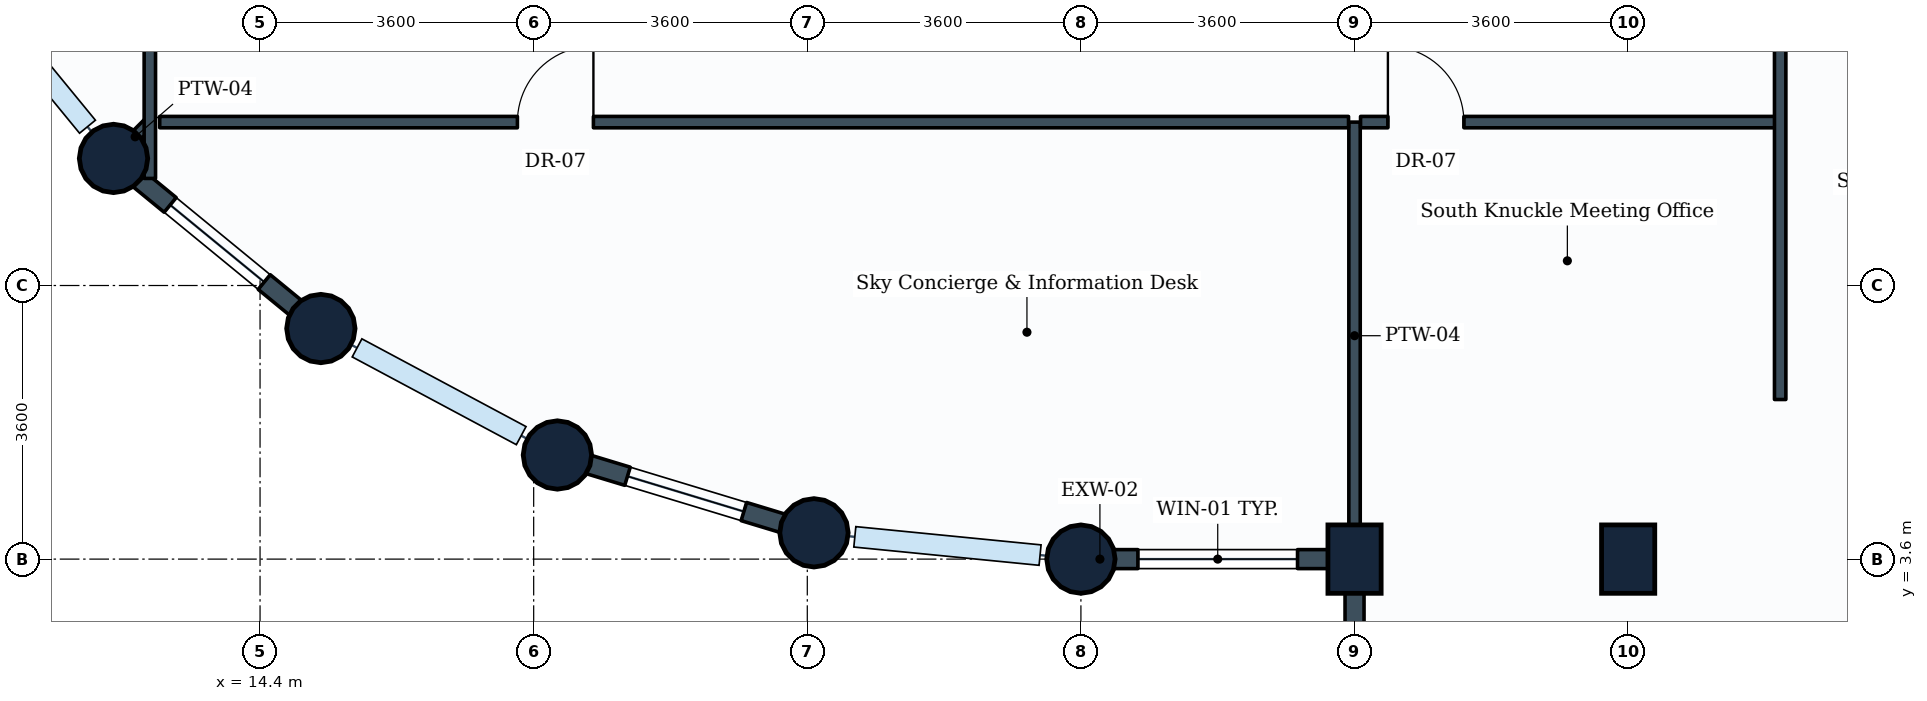
"""IFC4 building model, lengths in metres.
Left out: names, types, materials, properties, quantities, classifications, styles, units other than length and angle.
Written with IfcOpenShell. Run it as: python <this file> out.ifc"""

import sys

from ifc_helpers import new_model, si_unit, direction, frame, frame_2d, origin, origin_2d, place, context, subcontext, project, spatial, rectangle, circle, extrude, element, fill, save


model = new_model("IFC4")
c1 = context("Model", 3, precision=1e-05, world=origin(), true_north=direction((0.0, 1.0)))
c2 = subcontext(c1, "Body", "Model", "MODEL_VIEW")
j1 = project(units=[si_unit("LENGTHUNIT", "METRE"), si_unit("PLANEANGLEUNIT", "RADIAN")], contexts=[c1])
p1 = place(None, origin())
s1 = spatial("IfcSite", under=j1, at=p1, CompositionType="ELEMENT")
p2 = place(p1, origin())
s2 = spatial("IfcBuilding", under=s1, at=p2, CompositionType="ELEMENT")
p3 = place(p2, frame((0.0, 0.0, 209.0)))
s3 = spatial("IfcBuildingStorey", under=s2, at=p3, CompositionType="ELEMENT", Elevation=209.0)
for number, where, z_axis, x_axis in (
    (1, (12.472, 8.872, 0.0), (0.0, 0.0, 1.0), (1.0, 0.0, 0.0)),
    (2, (15.2, 6.634, 0.0), (0.0, 0.0, 1.0), (1.0, 0.0, 0.0)),
    (3, (18.312, 4.97, 0.0), (0.0, 0.0, 1.0), (1.0, 0.0, 0.0)),
    (4, (21.688, 3.946, 0.0), (0.0, 0.0, 1.0), (1.0, 0.0, 0.0)),
    (5, (25.2, 3.6, 0.0), (0.0, 0.0, 1.0), (1.0, 0.0, 0.0)),
):
    element("IfcColumn", number, at=place(p3, frame(where, z_axis=z_axis, x_axis=x_axis)), inside=s3, PredefinedType="COLUMN", context=c2, shape_type="SweptSolid", body=[
        extrude(circle(Radius=0.45, at=origin_2d()), origin(), (0.0, 0.0, 1.0), 4.8),
    ])
for number, where, z_axis, x_axis in (
    (6, (28.8, 3.6, 0.0), (0.0, 0.0, 1.0), (1.0, 0.0, 0.0)),
    (7, (32.4, 3.6, 0.0), (0.0, 0.0, 1.0), (1.0, 0.0, 0.0)),
):
    element("IfcColumn", number, at=place(p3, frame(where, z_axis=z_axis, x_axis=x_axis)), inside=s3, PredefinedType="COLUMN", context=c2, shape_type="SweptSolid", body=[
        extrude(rectangle(XDim=0.7, YDim=0.9, at=origin_2d()), origin(), (0.0, 0.0, 1.0), 4.8),
    ])
p4 = place(p3, frame((28.8, 3.6, 0.0), z_axis=(0.0, 0.0, 1.0), x_axis=(-1.0, 0.0, 0.0)))
e8 = element("IfcWall", 8, at=p4, inside=s3, PredefinedType="STANDARD", context=c2, shape_type="SweptSolid", body=[
    extrude(rectangle(XDim=3.6, YDim=0.25, at=frame_2d((1.8, 0.0))), origin(), (0.0, 0.0, 1.0), 3.93),
])
p5 = place(p4, frame((0.75, 0.0, 0.85)))
e9 = element("IfcOpeningElement", 9, at=p5, cuts=e8, PredefinedType="OPENING", context=c2, shape_type="SweptSolid", body=[
    extrude(rectangle(XDim=2.1, YDim=1.35, at=frame_2d((1.05, 0.675))), frame((0.0, 0.135, 0.0), z_axis=(0.0, -1.0, 0.0), x_axis=(1.0, 0.0, 0.0)), (0.0, 0.0, 1.0), 0.27),
])
p6 = place(p3, frame((28.8, 3.6, 0.0), z_axis=(0.0, 0.0, 1.0), x_axis=(0.0, -1.0, 0.0)))
e10 = element("IfcWall", 10, at=p6, inside=s3, PredefinedType="STANDARD", context=c2, shape_type="SweptSolid", body=[
    extrude(rectangle(XDim=2.1, YDim=0.25, at=frame_2d((1.05, 0.0))), origin(), (0.0, 0.0, 1.0), 3.93),
])
p7 = place(p3, frame((15.2, 6.634, 0.0), z_axis=(0.0, 0.0, 1.0), x_axis=(-0.773121216285, 0.634258295121, 0.0)))
e11 = element("IfcWall", 11, at=p7, inside=s3, PredefinedType="STANDARD", context=c2, shape_type="SweptSolid", body=[
    extrude(rectangle(XDim=3.529, YDim=0.25, at=frame_2d((1.764, 0.0))), origin(), (0.0, 0.0, 1.0), 3.93),
])
p8 = place(p7, frame((0.964, 0.0, 0.85)))
e12 = element("IfcOpeningElement", 12, at=p8, cuts=e11, PredefinedType="OPENING", context=c2, shape_type="SweptSolid", body=[
    extrude(rectangle(XDim=1.6, YDim=1.35, at=frame_2d((0.8, 0.675))), frame((0.0, 0.135, 0.0), z_axis=(0.0, -1.0, 0.0), x_axis=(1.0, 0.0, 0.0)), (0.0, 0.0, 1.0), 0.27),
])
p9 = place(p3, frame((21.688, 3.946, 0.0), z_axis=(0.0, 0.0, 1.0), x_axis=(-0.956953367403, 0.290241714123, 0.0)))
e13 = element("IfcWall", 13, at=p9, inside=s3, PredefinedType="STANDARD", context=c2, shape_type="SweptSolid", body=[
    extrude(rectangle(XDim=3.528, YDim=0.25, at=frame_2d((1.764, 0.0))), origin(), (0.0, 0.0, 1.0), 3.93),
])
p10 = place(p9, frame((0.964, 0.0, 0.85)))
e14 = element("IfcOpeningElement", 14, at=p10, cuts=e13, PredefinedType="OPENING", context=c2, shape_type="SweptSolid", body=[
    extrude(rectangle(XDim=1.6, YDim=1.35, at=frame_2d((0.8, 0.675))), frame((0.0, 0.135, 0.0), z_axis=(0.0, -1.0, 0.0), x_axis=(1.0, 0.0, 0.0)), (0.0, 0.0, 1.0), 0.27),
])
p11 = place(p3, frame((28.8, 9.35, 0.0), z_axis=(0.0, 0.0, 1.0), x_axis=(0.0, -1.0, 0.0)))
e15 = element("IfcWall", 15, at=p11, inside=s3, PredefinedType="PARTITIONING", context=c2, shape_type="SweptSolid", body=[
    extrude(rectangle(XDim=5.621, YDim=0.15, at=frame_2d((2.811, 0.0))), origin(), (0.0, 0.0, 1.0), 4.535),
])
p12 = place(p3, frame((12.95, 9.35, 0.0), z_axis=(0.0, 0.0, 1.0), x_axis=(-0.706883613527, -0.707329878435, 0.0)))
e16 = element("IfcWall", 16, at=p12, inside=s3, PredefinedType="PARTITIONING", context=c2, shape_type="SweptSolid", body=[
    extrude(rectangle(XDim=0.547, YDim=0.15, at=frame_2d((0.273, 0.0))), origin(), (0.0, 0.0, 1.0), 4.26),
])
p13 = place(p3, frame((12.95, 8.609, 0.0), z_axis=(0.0, 0.0, 1.0), x_axis=(0.0, 1.0, 0.0)))
e17 = element("IfcWall", 17, at=p13, inside=s3, PredefinedType="PARTITIONING", context=c2, shape_type="SweptSolid", body=[
    extrude(rectangle(XDim=16.512, YDim=0.15, at=frame_2d((8.256, 0.0))), origin(), (0.0, 0.0, 1.0), 3.93),
])
p14 = place(p13, frame((7.731, 0.0, 0.0)))
e18 = element("IfcOpeningElement", 18, at=p14, cuts=e17, PredefinedType="OPENING", context=c2, shape_type="SweptSolid", body=[
    extrude(rectangle(XDim=1.0, YDim=2.1, at=frame_2d((0.5, 1.05))), frame((0.0, 0.085, 0.0), z_axis=(0.0, -1.0, 0.0), x_axis=(1.0, 0.0, 0.0)), (0.0, 0.0, 1.0), 0.17),
])
p15 = place(p3, frame((13.08, 9.35, 0.0), z_axis=(0.0, 0.0, 1.0), x_axis=(1.0, 0.0, 0.0)))
e19 = element("IfcWall", 19, at=p15, inside=s3, PredefinedType="PARTITIONING", context=c2, shape_type="SweptSolid", body=[
    extrude(rectangle(XDim=15.641, YDim=0.15, at=frame_2d((7.82, 0.0))), origin(), (0.0, 0.0, 1.0), 4.22),
])
p16 = place(p15, frame((4.706, 0.0, 0.0)))
e20 = element("IfcOpeningElement", 20, at=p16, cuts=e19, PredefinedType="OPENING", context=c2, shape_type="SweptSolid", body=[
    extrude(rectangle(XDim=1.0, YDim=2.1, at=frame_2d((0.5, 1.05))), frame((0.0, 0.085, 0.0), z_axis=(0.0, -1.0, 0.0), x_axis=(1.0, 0.0, 0.0)), (0.0, 0.0, 1.0), 0.17),
])
p17 = place(p3, frame((28.879, 9.35, 0.0), z_axis=(0.0, 0.0, 1.0), x_axis=(1.0, 0.0, 0.0)))
e21 = element("IfcWall", 21, at=p17, inside=s3, PredefinedType="PARTITIONING", context=c2, shape_type="SweptSolid", body=[
    extrude(rectangle(XDim=5.521, YDim=0.15, at=frame_2d((2.76, 0.0))), origin(), (0.0, 0.0, 1.0), 4.535),
])
p18 = place(p17, frame((0.36, 0.0, 0.0)))
e22 = element("IfcOpeningElement", 22, at=p18, cuts=e21, PredefinedType="OPENING", context=c2, shape_type="SweptSolid", body=[
    extrude(rectangle(XDim=1.0, YDim=2.1, at=frame_2d((0.5, 1.05))), frame((0.0, 0.085, 0.0), z_axis=(0.0, -1.0, 0.0), x_axis=(1.0, 0.0, 0.0)), (0.0, 0.0, 1.0), 0.17),
])
p19 = place(p3, frame((34.4, 5.7, 0.0), z_axis=(0.0, 0.0, 1.0), x_axis=(0.0, 1.0, 0.0)))
e23 = element("IfcWall", 23, at=p19, inside=s3, PredefinedType="PARTITIONING", context=c2, shape_type="SweptSolid", body=[
    extrude(rectangle(XDim=4.95, YDim=0.15, at=frame_2d((2.475, 0.0))), origin(), (0.0, 0.0, 1.0), 4.535),
])
p20 = place(p5, origin())
e24 = element("IfcWindow", 24, at=p20, inside=s3, PartitioningType="SINGLE_PANEL", PredefinedType="WINDOW", context=c2, shape_type="SweptSolid", body=[
    extrude(rectangle(XDim=2.1, YDim=1.35, at=frame_2d((1.05, 0.675))), frame((0.0, 0.03, 0.0), z_axis=(0.0, -1.0, 0.0), x_axis=(1.0, 0.0, 0.0)), (0.0, 0.0, 1.0), 0.06),
])
fill(e9, e24)
p21 = place(p8, origin())
e25 = element("IfcWindow", 25, at=p21, inside=s3, PartitioningType="SINGLE_PANEL", PredefinedType="WINDOW", context=c2, shape_type="SweptSolid", body=[
    extrude(rectangle(XDim=1.6, YDim=1.35, at=frame_2d((0.8, 0.675))), frame((0.0, 0.03, 0.0), z_axis=(0.0, -1.0, 0.0), x_axis=(1.0, 0.0, 0.0)), (0.0, 0.0, 1.0), 0.06),
])
fill(e12, e25)
p22 = place(p10, origin())
e26 = element("IfcWindow", 26, at=p22, inside=s3, PartitioningType="SINGLE_PANEL", PredefinedType="WINDOW", context=c2, shape_type="SweptSolid", body=[
    extrude(rectangle(XDim=1.6, YDim=1.35, at=frame_2d((0.8, 0.675))), frame((0.0, 0.03, 0.0), z_axis=(0.0, -1.0, 0.0), x_axis=(1.0, 0.0, 0.0)), (0.0, 0.0, 1.0), 0.06),
])
fill(e14, e26)
p23 = place(p16, origin())
e27 = element("IfcDoor", 27, at=p23, inside=s3, OperationType="SINGLE_SWING_RIGHT", PredefinedType="DOOR", context=c2, shape_type="SweptSolid", body=[
    extrude(rectangle(XDim=1.0, YDim=2.1, at=frame_2d((0.5, 1.05))), frame((0.0, 0.025, 0.0), z_axis=(0.0, -1.0, 0.0), x_axis=(1.0, 0.0, 0.0)), (0.0, 0.0, 1.0), 0.05),
])
fill(e20, e27)
p24 = place(p18, origin())
e28 = element("IfcDoor", 28, at=p24, inside=s3, OperationType="SINGLE_SWING_LEFT", PredefinedType="DOOR", context=c2, shape_type="SweptSolid", body=[
    extrude(rectangle(XDim=1.0, YDim=2.1, at=frame_2d((0.5, 1.05))), frame((0.0, 0.025, 0.0), z_axis=(0.0, -1.0, 0.0), x_axis=(1.0, 0.0, 0.0)), (0.0, 0.0, 1.0), 0.05),
])
fill(e22, e28)
save(model, sys.argv[1])
